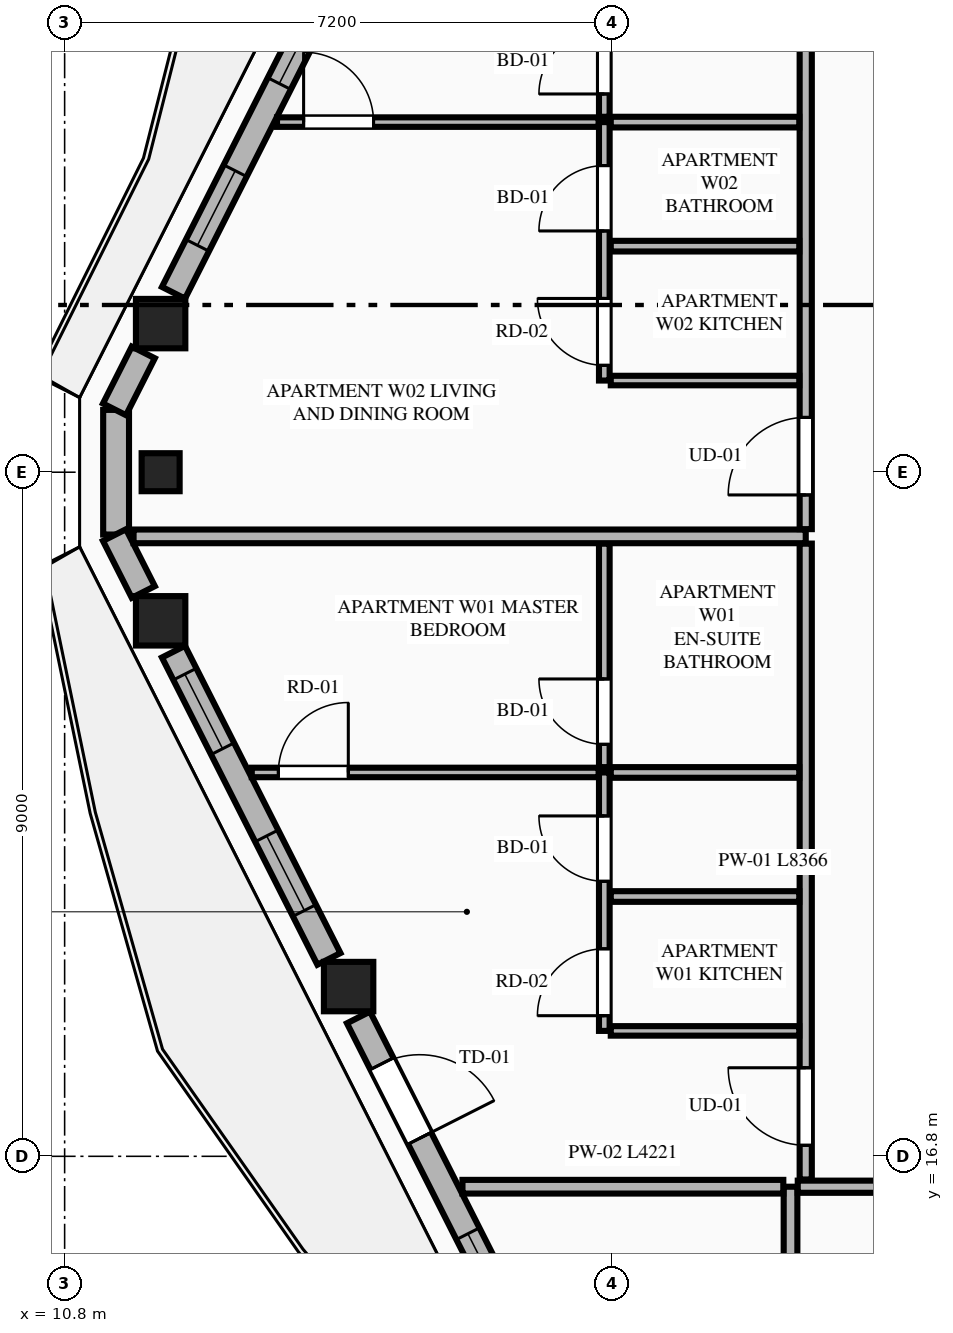
"""IFC4 building model, lengths in metres.
Left out: names, types, materials, properties, quantities, classifications, styles, units other than length and angle.
Written with IfcOpenShell. Run it as: python <this file> out.ifc"""

import sys

from ifc_helpers import new_model, si_unit, direction, frame, frame_2d, origin, origin_2d, place, context, subcontext, project, spatial, rectangle, extrude, element, fill, save


model = new_model("IFC4")
c1 = context("Model", 3, precision=1e-05, world=origin(), true_north=direction((0.0, 1.0)))
c2 = subcontext(c1, "Body", "Model", "MODEL_VIEW")
j1 = project(units=[si_unit("LENGTHUNIT", "METRE"), si_unit("PLANEANGLEUNIT", "RADIAN")], contexts=[c1])
p1 = place(None, origin())
s1 = spatial("IfcSite", under=j1, at=p1, CompositionType="ELEMENT")
p2 = place(p1, origin())
s2 = spatial("IfcBuilding", under=s1, at=p2, CompositionType="ELEMENT")
p3 = place(p2, frame((0.0, 0.0, 259.85)))
s3 = spatial("IfcBuildingStorey", under=s2, at=p3, CompositionType="ELEMENT", Elevation=259.85)
for number, where, z_axis, x_axis in (
    (1, (12.063, 27.755, 0.0), (0.0, 0.0, 1.0), (1.0, 0.0, 0.0)),
    (2, (12.063, 23.845, 0.0), (0.0, 0.0, 1.0), (1.0, 0.0, 0.0)),
    (3, (14.536, 19.033, 0.0), (0.0, 0.0, 1.0), (1.0, 0.0, 0.0)),
):
    element("IfcColumn", number, at=place(p3, frame(where, z_axis=z_axis, x_axis=x_axis)), inside=s3, PredefinedType="COLUMN", context=c2, shape_type="SweptSolid", body=[
        extrude(rectangle(XDim=0.65, YDim=0.65, at=origin_2d()), origin(), (0.0, 0.0, 1.0), 3.65),
    ])
p4 = place(p3, frame((12.063, 25.8, 0.0), z_axis=(0.0, 0.0, 1.0), x_axis=(0.0, -1.0, 0.0)))
e4 = element("IfcColumn", 4, at=p4, inside=s3, PredefinedType="PILASTER", context=c2, shape_type="SweptSolid", body=[
    extrude(rectangle(XDim=0.5, YDim=0.35, at=origin_2d()), origin(), (0.0, 0.0, 1.0), 3.65),
])
p5 = place(p3, frame((11.477, 26.62, 0.0), z_axis=(0.0, 0.0, 1.0), x_axis=(0.0, -1.0, 0.0)))
e5 = element("IfcWall", 5, at=p5, inside=s3, PredefinedType="STANDARD", context=c2, shape_type="SweptSolid", body=[
    extrude(rectangle(XDim=1.64, YDim=0.34, at=frame_2d((0.82, 0.0))), origin(), (0.0, 0.0, 1.0), 3.45),
])
p6 = place(p3, frame((14.277, 32.203, 0.0), z_axis=(0.0, 0.0, 1.0), x_axis=(-0.45147697324, -0.892282770558, 0.0)))
e6 = element("IfcWall", 6, at=p6, inside=s3, PredefinedType="STANDARD", context=c2, shape_type="SweptSolid", body=[
    extrude(rectangle(XDim=4.53, YDim=0.34, at=frame_2d((2.265, 0.0))), origin(), (0.0, 0.0, 1.0), 2.983),
])
p7 = place(p6, frame((0.346, 0.0, 0.75)))
e7 = element("IfcOpeningElement", 7, at=p7, cuts=e6, PredefinedType="OPENING", context=c2, shape_type="SweptSolid", body=[
    extrude(rectangle(XDim=1.1, YDim=2.0, at=frame_2d((0.55, 1.0))), frame((0.0, 0.18, 0.0), z_axis=(0.0, -1.0, 0.0), x_axis=(1.0, 0.0, 0.0)), (0.0, 0.0, 1.0), 0.36),
])
p8 = place(p6, frame((2.731, 0.0, 0.75)))
e8 = element("IfcOpeningElement", 8, at=p8, cuts=e6, PredefinedType="OPENING", context=c2, shape_type="SweptSolid", body=[
    extrude(rectangle(XDim=1.1, YDim=2.0, at=frame_2d((0.55, 1.0))), frame((0.0, 0.18, 0.0), z_axis=(0.0, -1.0, 0.0), x_axis=(1.0, 0.0, 0.0)), (0.0, 0.0, 1.0), 0.36),
])
p9 = place(p3, frame((11.835, 27.376, 0.0), z_axis=(0.0, 0.0, 1.0), x_axis=(-0.45139691133, -0.892323275748, 0.0)))
e9 = element("IfcWall", 9, at=p9, inside=s3, PredefinedType="STANDARD", context=c2, shape_type="SweptSolid", body=[
    extrude(rectangle(XDim=0.839, YDim=0.34, at=frame_2d((0.42, 0.0))), origin(), (0.0, 0.0, 1.0), 3.45),
])
p10 = place(p3, frame((11.456, 24.973, 0.0), z_axis=(0.0, 0.0, 1.0), x_axis=(0.4515140893, -0.892263989615, 0.0)))
e10 = element("IfcWall", 10, at=p10, inside=s3, PredefinedType="STANDARD", context=c2, shape_type="SweptSolid", body=[
    extrude(rectangle(XDim=0.839, YDim=0.34, at=frame_2d((0.419, 0.0))), origin(), (0.0, 0.0, 1.0), 3.45),
])
p11 = place(p3, frame((12.232, 23.439, 0.0), z_axis=(0.0, 0.0, 1.0), x_axis=(0.45147697324, -0.892282770558, 0.0)))
e11 = element("IfcWall", 11, at=p11, inside=s3, PredefinedType="STANDARD", context=c2, shape_type="SweptSolid", body=[
    extrude(rectangle(XDim=4.53, YDim=0.34, at=frame_2d((2.265, 0.0))), origin(), (0.0, 0.0, 1.0), 2.983),
])
p12 = place(p11, frame((0.331, 0.0, 0.75)))
e12 = element("IfcOpeningElement", 12, at=p12, cuts=e11, PredefinedType="OPENING", context=c2, shape_type="SweptSolid", body=[
    extrude(rectangle(XDim=1.1, YDim=2.0, at=frame_2d((0.55, 1.0))), frame((0.0, 0.18, 0.0), z_axis=(0.0, -1.0, 0.0), x_axis=(1.0, 0.0, 0.0)), (0.0, 0.0, 1.0), 0.36),
])
p13 = place(p11, frame((2.716, 0.0, 0.75)))
e13 = element("IfcOpeningElement", 13, at=p13, cuts=e11, PredefinedType="OPENING", context=c2, shape_type="SweptSolid", body=[
    extrude(rectangle(XDim=1.1, YDim=2.0, at=frame_2d((0.55, 1.0))), frame((0.0, 0.18, 0.0), z_axis=(0.0, -1.0, 0.0), x_axis=(1.0, 0.0, 0.0)), (0.0, 0.0, 1.0), 0.36),
])
p14 = place(p3, frame((14.666, 18.627, 0.0), z_axis=(0.0, 0.0, 1.0), x_axis=(0.451468341582, -0.892287137949, 0.0)))
e14 = element("IfcWall", 14, at=p14, inside=s3, PredefinedType="STANDARD", context=c2, shape_type="SweptSolid", body=[
    extrude(rectangle(XDim=4.723, YDim=0.34, at=frame_2d((2.361, 0.0))), origin(), (0.0, 0.0, 1.0), 2.983),
])
p15 = place(p14, frame((0.682, 0.0, 0.0)))
e15 = element("IfcOpeningElement", 15, at=p15, cuts=e14, PredefinedType="OPENING", context=c2, shape_type="SweptSolid", body=[
    extrude(rectangle(XDim=1.1, YDim=2.25, at=frame_2d((0.55, 1.125))), frame((0.0, 0.18, 0.0), z_axis=(0.0, -1.0, 0.0), x_axis=(1.0, 0.0, 0.0)), (0.0, 0.0, 1.0), 0.36),
])
p16 = place(p14, frame((3.189, 0.0, 0.75)))
e16 = element("IfcOpeningElement", 16, at=p16, cuts=e14, PredefinedType="OPENING", context=c2, shape_type="SweptSolid", body=[
    extrude(rectangle(XDim=1.1, YDim=2.0, at=frame_2d((0.55, 1.0))), frame((0.0, 0.18, 0.0), z_axis=(0.0, -1.0, 0.0), x_axis=(1.0, 0.0, 0.0)), (0.0, 0.0, 1.0), 0.36),
])
p17 = place(p3, frame((20.35, 8.119, 0.0), z_axis=(0.0, 0.0, 1.0), x_axis=(0.0, 1.0, 0.0)))
e17 = element("IfcWall", 17, at=p17, inside=s3, PredefinedType="PARTITIONING", context=c2, shape_type="SweptSolid", body=[
    extrude(rectangle(XDim=8.281, YDim=0.18, at=frame_2d((4.141, 0.0))), origin(), (0.0, 0.0, 1.0), 3.45),
])
p18 = place(p3, frame((20.445, 16.4, 0.0), z_axis=(0.0, 0.0, 1.0), x_axis=(1.0, 0.0, 0.0)))
e18 = element("IfcWall", 18, at=p18, inside=s3, PredefinedType="PARTITIONING", context=c2, shape_type="SweptSolid", body=[
    extrude(rectangle(XDim=15.114, YDim=0.16, at=frame_2d((7.557, 0.0))), origin(), (0.0, 0.0, 1.0), 3.45),
])
p19 = place(p18, frame((13.259, 0.0, 0.0)))
e19 = element("IfcOpeningElement", 19, at=p19, cuts=e18, PredefinedType="OPENING", context=c2, shape_type="SweptSolid", body=[
    extrude(rectangle(XDim=1.02, YDim=2.25, at=frame_2d((0.51, 1.125))), frame((0.0, 0.09, 0.0), z_axis=(0.0, -1.0, 0.0), x_axis=(1.0, 0.0, 0.0)), (0.0, 0.0, 1.0), 0.18),
])
p20 = place(p3, frame((16.034, 16.4, 0.0), z_axis=(0.0, 0.0, 1.0), x_axis=(1.0, 0.0, 0.0)))
e20 = element("IfcWall", 20, at=p20, inside=s3, PredefinedType="PARTITIONING", context=c2, shape_type="SweptSolid", body=[
    extrude(rectangle(XDim=4.221, YDim=0.18, at=frame_2d((2.11, 0.0))), origin(), (0.0, 0.0, 1.0), 3.45),
])
p21 = place(p3, frame((20.55, 16.495, 0.0), z_axis=(0.0, 0.0, 1.0), x_axis=(0.0, 1.0, 0.0)))
e21 = element("IfcWall", 21, at=p21, inside=s3, PredefinedType="PARTITIONING", context=c2, shape_type="SweptSolid", body=[
    extrude(rectangle(XDim=8.366, YDim=0.16, at=frame_2d((4.183, 0.0))), origin(), (0.0, 0.0, 1.0), 3.137),
])
p22 = place(p21, frame((0.45, 0.0, 0.0)))
e22 = element("IfcOpeningElement", 22, at=p22, cuts=e21, PredefinedType="OPENING", context=c2, shape_type="SweptSolid", body=[
    extrude(rectangle(XDim=1.02, YDim=2.25, at=frame_2d((0.51, 1.125))), frame((0.0, 0.09, 0.0), z_axis=(0.0, -1.0, 0.0), x_axis=(1.0, 0.0, 0.0)), (0.0, 0.0, 1.0), 0.18),
])
p23 = place(p3, frame((17.985, 18.45, 0.0), z_axis=(0.0, 0.0, 1.0), x_axis=(1.0, 0.0, 0.0)))
e23 = element("IfcWall", 23, at=p23, inside=s3, PredefinedType="PARTITIONING", context=c2, shape_type="SweptSolid", body=[
    extrude(rectangle(XDim=2.48, YDim=0.125, at=frame_2d((1.24, 0.0))), origin(), (0.0, 0.0, 1.0), 3.45),
])
p24 = place(p3, frame((17.9, 18.45, 0.0), z_axis=(0.0, 0.0, 1.0), x_axis=(0.0, 1.0, 0.0)))
e24 = element("IfcWall", 24, at=p24, inside=s3, PredefinedType="PLUMBINGWALL", context=c2, shape_type="SweptSolid", body=[
    extrude(rectangle(XDim=3.4, YDim=0.14, at=frame_2d((1.7, 0.0))), origin(), (0.0, 0.0, 1.0), 3.45),
])
p25 = place(p24, frame((0.2, 0.0, 0.0)))
e25 = element("IfcOpeningElement", 25, at=p25, cuts=e24, PredefinedType="OPENING", context=c2, shape_type="SweptSolid", body=[
    extrude(rectangle(XDim=0.88, YDim=2.15, at=frame_2d((0.44, 1.075))), frame((0.0, 0.08, 0.0), z_axis=(0.0, -1.0, 0.0), x_axis=(1.0, 0.0, 0.0)), (0.0, 0.0, 1.0), 0.16),
])
p26 = place(p24, frame((1.968, 0.0, 0.0)))
e26 = element("IfcOpeningElement", 26, at=p26, cuts=e24, PredefinedType="OPENING", context=c2, shape_type="SweptSolid", body=[
    extrude(rectangle(XDim=0.86, YDim=2.1, at=frame_2d((0.43, 1.05))), frame((0.0, 0.08, 0.0), z_axis=(0.0, -1.0, 0.0), x_axis=(1.0, 0.0, 0.0)), (0.0, 0.0, 1.0), 0.16),
])
p27 = place(p3, frame((17.9, 21.92, 0.0), z_axis=(0.0, 0.0, 1.0), x_axis=(0.0, 1.0, 0.0)))
e27 = element("IfcWall", 27, at=p27, inside=s3, PredefinedType="PLUMBINGWALL", context=c2, shape_type="SweptSolid", body=[
    extrude(rectangle(XDim=2.941, YDim=0.14, at=frame_2d((1.471, 0.0))), origin(), (0.0, 0.0, 1.0), 3.45),
])
p28 = place(p27, frame((0.3, 0.0, 0.0)))
e28 = element("IfcOpeningElement", 28, at=p28, cuts=e27, PredefinedType="OPENING", context=c2, shape_type="SweptSolid", body=[
    extrude(rectangle(XDim=0.86, YDim=2.1, at=frame_2d((0.43, 1.05))), frame((0.0, 0.08, 0.0), z_axis=(0.0, -1.0, 0.0), x_axis=(1.0, 0.0, 0.0)), (0.0, 0.0, 1.0), 0.16),
])
p29 = place(p3, frame((17.985, 21.85, 0.0), z_axis=(0.0, 0.0, 1.0), x_axis=(1.0, 0.0, 0.0)))
e29 = element("IfcWall", 29, at=p29, inside=s3, PredefinedType="PLUMBINGWALL", context=c2, shape_type="SweptSolid", body=[
    extrude(rectangle(XDim=2.48, YDim=0.14, at=frame_2d((1.24, 0.0))), origin(), (0.0, 0.0, 1.0), 3.45),
])
p30 = place(p3, frame((13.262, 21.85, 0.0), z_axis=(0.0, 0.0, 1.0), x_axis=(1.0, 0.0, 0.0)))
e30 = element("IfcWall", 30, at=p30, inside=s3, PredefinedType="PARTITIONING", context=c2, shape_type="SweptSolid", body=[
    extrude(rectangle(XDim=4.563, YDim=0.125, at=frame_2d((2.281, 0.0))), origin(), (0.0, 0.0, 1.0), 3.45),
])
p31 = place(p30, frame((0.35, 0.0, 0.0)))
e31 = element("IfcOpeningElement", 31, at=p31, cuts=e30, PredefinedType="OPENING", context=c2, shape_type="SweptSolid", body=[
    extrude(rectangle(XDim=0.92, YDim=2.15, at=frame_2d((0.46, 1.075))), frame((0.0, 0.073, 0.0), z_axis=(0.0, -1.0, 0.0), x_axis=(1.0, 0.0, 0.0)), (0.0, 0.0, 1.0), 0.145),
])
p32 = place(p3, frame((17.985, 20.218, 0.0), z_axis=(0.0, 0.0, 1.0), x_axis=(1.0, 0.0, 0.0)))
e32 = element("IfcWall", 32, at=p32, inside=s3, PredefinedType="PLUMBINGWALL", context=c2, shape_type="SweptSolid", body=[
    extrude(rectangle(XDim=2.48, YDim=0.14, at=frame_2d((1.24, 0.0))), origin(), (0.0, 0.0, 1.0), 3.45),
])
p33 = place(p3, frame((11.707, 24.956, 0.0), z_axis=(0.0, 0.0, 1.0), x_axis=(1.0, 0.0, 0.0)))
e33 = element("IfcWall", 33, at=p33, inside=s3, PredefinedType="PARTITIONING", context=c2, shape_type="SweptSolid", body=[
    extrude(rectangle(XDim=8.843, YDim=0.18, at=frame_2d((4.421, 0.0))), origin(), (0.0, 0.0, 1.0), 3.45),
])
p34 = place(p3, frame((20.55, 25.051, 0.0), z_axis=(0.0, 0.0, 1.0), x_axis=(0.0, 1.0, 0.0)))
e34 = element("IfcWall", 34, at=p34, inside=s3, PredefinedType="PARTITIONING", context=c2, shape_type="SweptSolid", body=[
    extrude(rectangle(XDim=9.854, YDim=0.16, at=frame_2d((4.927, 0.0))), origin(), (0.0, 0.0, 1.0), 3.137),
])
p35 = place(p34, frame((0.45, 0.0, 0.0)))
e35 = element("IfcOpeningElement", 35, at=p35, cuts=e34, PredefinedType="OPENING", context=c2, shape_type="SweptSolid", body=[
    extrude(rectangle(XDim=1.02, YDim=2.25, at=frame_2d((0.51, 1.125))), frame((0.0, 0.09, 0.0), z_axis=(0.0, -1.0, 0.0), x_axis=(1.0, 0.0, 0.0)), (0.0, 0.0, 1.0), 0.18),
])
p36 = place(p3, frame((17.985, 27.006, 0.0), z_axis=(0.0, 0.0, 1.0), x_axis=(1.0, 0.0, 0.0)))
e36 = element("IfcWall", 36, at=p36, inside=s3, PredefinedType="PARTITIONING", context=c2, shape_type="SweptSolid", body=[
    extrude(rectangle(XDim=2.48, YDim=0.125, at=frame_2d((1.24, 0.0))), origin(), (0.0, 0.0, 1.0), 3.45),
])
p37 = place(p3, frame((17.9, 27.006, 0.0), z_axis=(0.0, 0.0, 1.0), x_axis=(0.0, 1.0, 0.0)))
e37 = element("IfcWall", 37, at=p37, inside=s3, PredefinedType="PLUMBINGWALL", context=c2, shape_type="SweptSolid", body=[
    extrude(rectangle(XDim=3.4, YDim=0.14, at=frame_2d((1.7, 0.0))), origin(), (0.0, 0.0, 1.0), 3.45),
])
p38 = place(p37, frame((0.2, 0.0, 0.0)))
e38 = element("IfcOpeningElement", 38, at=p38, cuts=e37, PredefinedType="OPENING", context=c2, shape_type="SweptSolid", body=[
    extrude(rectangle(XDim=0.88, YDim=2.15, at=frame_2d((0.44, 1.075))), frame((0.0, 0.08, 0.0), z_axis=(0.0, -1.0, 0.0), x_axis=(1.0, 0.0, 0.0)), (0.0, 0.0, 1.0), 0.16),
])
p39 = place(p37, frame((1.968, 0.0, 0.0)))
e39 = element("IfcOpeningElement", 39, at=p39, cuts=e37, PredefinedType="OPENING", context=c2, shape_type="SweptSolid", body=[
    extrude(rectangle(XDim=0.86, YDim=2.1, at=frame_2d((0.43, 1.05))), frame((0.0, 0.08, 0.0), z_axis=(0.0, -1.0, 0.0), x_axis=(1.0, 0.0, 0.0)), (0.0, 0.0, 1.0), 0.16),
])
p40 = place(p3, frame((17.9, 30.476, 0.0), z_axis=(0.0, 0.0, 1.0), x_axis=(0.0, 1.0, 0.0)))
e40 = element("IfcWall", 40, at=p40, inside=s3, PredefinedType="PLUMBINGWALL", context=c2, shape_type="SweptSolid", body=[
    extrude(rectangle(XDim=4.429, YDim=0.14, at=frame_2d((2.214, 0.0))), origin(), (0.0, 0.0, 1.0), 3.45),
])
p41 = place(p40, frame((0.3, 0.0, 0.0)))
e41 = element("IfcOpeningElement", 41, at=p41, cuts=e40, PredefinedType="OPENING", context=c2, shape_type="SweptSolid", body=[
    extrude(rectangle(XDim=0.86, YDim=2.1, at=frame_2d((0.43, 1.05))), frame((0.0, 0.08, 0.0), z_axis=(0.0, -1.0, 0.0), x_axis=(1.0, 0.0, 0.0)), (0.0, 0.0, 1.0), 0.16),
])
p42 = place(p3, frame((17.985, 30.406, 0.0), z_axis=(0.0, 0.0, 1.0), x_axis=(1.0, 0.0, 0.0)))
e42 = element("IfcWall", 42, at=p42, inside=s3, PredefinedType="PLUMBINGWALL", context=c2, shape_type="SweptSolid", body=[
    extrude(rectangle(XDim=2.48, YDim=0.14, at=frame_2d((1.24, 0.0))), origin(), (0.0, 0.0, 1.0), 3.45),
])
p43 = place(p3, frame((13.594, 30.406, 0.0), z_axis=(0.0, 0.0, 1.0), x_axis=(1.0, 0.0, 0.0)))
e43 = element("IfcWall", 43, at=p43, inside=s3, PredefinedType="PARTITIONING", context=c2, shape_type="SweptSolid", body=[
    extrude(rectangle(XDim=4.231, YDim=0.125, at=frame_2d((2.115, 0.0))), origin(), (0.0, 0.0, 1.0), 3.45),
])
p44 = place(p43, frame((0.35, 0.0, 0.0)))
e44 = element("IfcOpeningElement", 44, at=p44, cuts=e43, PredefinedType="OPENING", context=c2, shape_type="SweptSolid", body=[
    extrude(rectangle(XDim=0.92, YDim=2.15, at=frame_2d((0.46, 1.075))), frame((0.0, 0.073, 0.0), z_axis=(0.0, -1.0, 0.0), x_axis=(1.0, 0.0, 0.0)), (0.0, 0.0, 1.0), 0.145),
])
p45 = place(p3, frame((17.985, 28.774, 0.0), z_axis=(0.0, 0.0, 1.0), x_axis=(1.0, 0.0, 0.0)))
e45 = element("IfcWall", 45, at=p45, inside=s3, PredefinedType="PLUMBINGWALL", context=c2, shape_type="SweptSolid", body=[
    extrude(rectangle(XDim=2.48, YDim=0.14, at=frame_2d((1.24, 0.0))), origin(), (0.0, 0.0, 1.0), 3.45),
])
p46 = place(p7, origin())
e46 = element("IfcWindow", 46, at=p46, inside=s3, PartitioningType="SINGLE_PANEL", PredefinedType="WINDOW", context=c2, shape_type="SweptSolid", body=[
    extrude(rectangle(XDim=1.1, YDim=2.0, at=frame_2d((0.55, 1.0))), frame((0.0, 0.03, 0.0), z_axis=(0.0, -1.0, 0.0), x_axis=(1.0, 0.0, 0.0)), (0.0, 0.0, 1.0), 0.06),
])
fill(e7, e46)
p47 = place(p12, origin())
e47 = element("IfcWindow", 47, at=p47, inside=s3, PartitioningType="SINGLE_PANEL", PredefinedType="WINDOW", context=c2, shape_type="SweptSolid", body=[
    extrude(rectangle(XDim=1.1, YDim=2.0, at=frame_2d((0.55, 1.0))), frame((0.0, 0.03, 0.0), z_axis=(0.0, -1.0, 0.0), x_axis=(1.0, 0.0, 0.0)), (0.0, 0.0, 1.0), 0.06),
])
fill(e12, e47)
p48 = place(p15, origin())
e48 = element("IfcDoor", 48, at=p48, inside=s3, OperationType="SINGLE_SWING_RIGHT", PredefinedType="DOOR", context=c2, shape_type="SweptSolid", body=[
    extrude(rectangle(XDim=1.1, YDim=2.25, at=frame_2d((0.55, 1.125))), frame((0.0, 0.025, 0.0), z_axis=(0.0, -1.0, 0.0), x_axis=(1.0, 0.0, 0.0)), (0.0, 0.0, 1.0), 0.05),
])
fill(e15, e48)
p49 = place(p25, origin())
e49 = element("IfcDoor", 49, at=p49, inside=s3, OperationType="SINGLE_SWING_LEFT", PredefinedType="DOOR", context=c2, shape_type="SweptSolid", body=[
    extrude(rectangle(XDim=0.88, YDim=2.15, at=frame_2d((0.44, 1.075))), frame((0.0, 0.025, 0.0), z_axis=(0.0, -1.0, 0.0), x_axis=(1.0, 0.0, 0.0)), (0.0, 0.0, 1.0), 0.05),
])
fill(e25, e49)
p50 = place(p26, origin())
e50 = element("IfcDoor", 50, at=p50, inside=s3, OperationType="SINGLE_SWING_RIGHT", PredefinedType="DOOR", context=c2, shape_type="SweptSolid", body=[
    extrude(rectangle(XDim=0.86, YDim=2.1, at=frame_2d((0.43, 1.05))), frame((0.0, 0.025, 0.0), z_axis=(0.0, -1.0, 0.0), x_axis=(1.0, 0.0, 0.0)), (0.0, 0.0, 1.0), 0.05),
])
fill(e26, e50)
p51 = place(p28, origin())
e51 = element("IfcDoor", 51, at=p51, inside=s3, OperationType="SINGLE_SWING_RIGHT", PredefinedType="DOOR", context=c2, shape_type="SweptSolid", body=[
    extrude(rectangle(XDim=0.86, YDim=2.1, at=frame_2d((0.43, 1.05))), frame((0.0, 0.025, 0.0), z_axis=(0.0, -1.0, 0.0), x_axis=(1.0, 0.0, 0.0)), (0.0, 0.0, 1.0), 0.05),
])
fill(e28, e51)
p52 = place(p22, origin())
e52 = element("IfcDoor", 52, at=p52, inside=s3, OperationType="SINGLE_SWING_RIGHT", PredefinedType="DOOR", context=c2, shape_type="SweptSolid", body=[
    extrude(rectangle(XDim=1.02, YDim=2.25, at=frame_2d((0.51, 1.125))), frame((0.0, 0.025, 0.0), z_axis=(0.0, -1.0, 0.0), x_axis=(1.0, 0.0, 0.0)), (0.0, 0.0, 1.0), 0.05),
])
fill(e22, e52)
p53 = place(p31, origin())
e53 = element("IfcDoor", 53, at=p53, inside=s3, OperationType="SINGLE_SWING_RIGHT", PredefinedType="DOOR", context=c2, shape_type="SweptSolid", body=[
    extrude(rectangle(XDim=0.92, YDim=2.15, at=frame_2d((0.46, 1.075))), frame((0.0, 0.025, 0.0), z_axis=(0.0, -1.0, 0.0), x_axis=(1.0, 0.0, 0.0)), (0.0, 0.0, 1.0), 0.05),
])
fill(e31, e53)
p54 = place(p38, origin())
e54 = element("IfcDoor", 54, at=p54, inside=s3, OperationType="SINGLE_SWING_RIGHT", PredefinedType="DOOR", context=c2, shape_type="SweptSolid", body=[
    extrude(rectangle(XDim=0.88, YDim=2.15, at=frame_2d((0.44, 1.075))), frame((0.0, 0.025, 0.0), z_axis=(0.0, -1.0, 0.0), x_axis=(1.0, 0.0, 0.0)), (0.0, 0.0, 1.0), 0.05),
])
fill(e38, e54)
p55 = place(p39, origin())
e55 = element("IfcDoor", 55, at=p55, inside=s3, OperationType="SINGLE_SWING_LEFT", PredefinedType="DOOR", context=c2, shape_type="SweptSolid", body=[
    extrude(rectangle(XDim=0.86, YDim=2.1, at=frame_2d((0.43, 1.05))), frame((0.0, 0.025, 0.0), z_axis=(0.0, -1.0, 0.0), x_axis=(1.0, 0.0, 0.0)), (0.0, 0.0, 1.0), 0.05),
])
fill(e39, e55)
p56 = place(p41, origin())
e56 = element("IfcDoor", 56, at=p56, inside=s3, OperationType="SINGLE_SWING_LEFT", PredefinedType="DOOR", context=c2, shape_type="SweptSolid", body=[
    extrude(rectangle(XDim=0.86, YDim=2.1, at=frame_2d((0.43, 1.05))), frame((0.0, 0.025, 0.0), z_axis=(0.0, -1.0, 0.0), x_axis=(1.0, 0.0, 0.0)), (0.0, 0.0, 1.0), 0.05),
])
fill(e41, e56)
p57 = place(p35, origin())
e57 = element("IfcDoor", 57, at=p57, inside=s3, OperationType="SINGLE_SWING_LEFT", PredefinedType="DOOR", context=c2, shape_type="SweptSolid", body=[
    extrude(rectangle(XDim=1.02, YDim=2.25, at=frame_2d((0.51, 1.125))), frame((0.0, 0.025, 0.0), z_axis=(0.0, -1.0, 0.0), x_axis=(1.0, 0.0, 0.0)), (0.0, 0.0, 1.0), 0.05),
])
fill(e35, e57)
p58 = place(p44, origin())
e58 = element("IfcDoor", 58, at=p58, inside=s3, OperationType="SINGLE_SWING_LEFT", PredefinedType="DOOR", context=c2, shape_type="SweptSolid", body=[
    extrude(rectangle(XDim=0.92, YDim=2.15, at=frame_2d((0.46, 1.075))), frame((0.0, 0.025, 0.0), z_axis=(0.0, -1.0, 0.0), x_axis=(1.0, 0.0, 0.0)), (0.0, 0.0, 1.0), 0.05),
])
fill(e44, e58)
p59 = place(p8, origin())
e59 = element("IfcWindow", 59, at=p59, inside=s3, PartitioningType="SINGLE_PANEL", PredefinedType="WINDOW", context=c2, shape_type="SweptSolid", body=[
    extrude(rectangle(XDim=1.1, YDim=2.0, at=frame_2d((0.55, 1.0))), frame((0.0, 0.03, 0.0), z_axis=(0.0, -1.0, 0.0), x_axis=(1.0, 0.0, 0.0)), (0.0, 0.0, 1.0), 0.06),
])
fill(e8, e59)
p60 = place(p13, origin())
e60 = element("IfcWindow", 60, at=p60, inside=s3, PartitioningType="SINGLE_PANEL", PredefinedType="WINDOW", context=c2, shape_type="SweptSolid", body=[
    extrude(rectangle(XDim=1.1, YDim=2.0, at=frame_2d((0.55, 1.0))), frame((0.0, 0.03, 0.0), z_axis=(0.0, -1.0, 0.0), x_axis=(1.0, 0.0, 0.0)), (0.0, 0.0, 1.0), 0.06),
])
fill(e13, e60)
p61 = place(p16, origin())
e61 = element("IfcWindow", 61, at=p61, inside=s3, PartitioningType="SINGLE_PANEL", PredefinedType="WINDOW", context=c2, shape_type="SweptSolid", body=[
    extrude(rectangle(XDim=1.1, YDim=2.0, at=frame_2d((0.55, 1.0))), frame((0.0, 0.03, 0.0), z_axis=(0.0, -1.0, 0.0), x_axis=(1.0, 0.0, 0.0)), (0.0, 0.0, 1.0), 0.06),
])
fill(e16, e61)
save(model, sys.argv[1])
